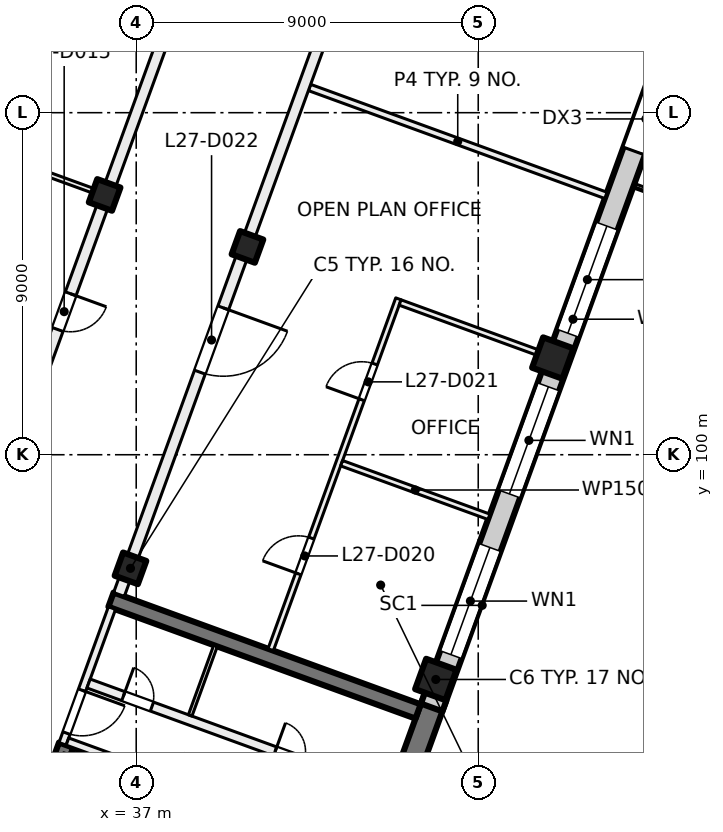
"""IFC4 building model, lengths in metres.
Left out: names, types, materials, properties, quantities, classifications, styles, units other than length and angle.
Written with IfcOpenShell. Run it as: python <this file> out.ifc"""

import sys

from ifc_helpers import new_model, si_unit, direction, frame, frame_2d, origin, origin_2d, place, context, subcontext, project, spatial, rectangle, extrude, element, fill, save


model = new_model("IFC4")
c1 = context("Model", 3, precision=1e-05, world=origin(), true_north=direction((0.0, 1.0)))
c2 = subcontext(c1, "Body", "Model", "MODEL_VIEW")
j1 = project(units=[si_unit("LENGTHUNIT", "METRE"), si_unit("PLANEANGLEUNIT", "RADIAN")], contexts=[c1])
p1 = place(None, origin())
s1 = spatial("IfcSite", under=j1, at=p1, CompositionType="ELEMENT")
p2 = place(p1, origin())
s2 = spatial("IfcBuilding", under=s1, at=p2, CompositionType="ELEMENT")
p3 = place(p2, frame((0.0, 0.0, 117.0)))
s3 = spatial("IfcBuildingStorey", under=s2, at=p3, CompositionType="ELEMENT", Elevation=117.0)
for number, where, z_axis, x_axis in (
    (1, (39.927, 105.468, 0.0), (0.0, 0.0, 1.0), (-0.342, -0.94, 0.0)),
    (2, (36.849, 97.011, 0.0), (0.0, 0.0, 1.0), (-0.342, -0.94, 0.0)),
    (3, (36.169, 106.836, 0.0), (0.0, 0.0, 1.0), (-0.342, -0.94, 0.0)),
):
    element("IfcColumn", number, at=place(p3, frame(where, z_axis=z_axis, x_axis=x_axis)), inside=s3, PredefinedType="COLUMN", context=c2, shape_type="SweptSolid", body=[
        extrude(rectangle(XDim=0.65, YDim=0.65, at=origin_2d()), origin(), (0.0, 0.0, 1.0), 4.0),
    ])
for number, where, z_axis, x_axis in (
    (4, (47.962, 102.544, 0.0), (0.0, 0.0, 1.0), (-0.342, -0.94, 0.0)),
    (5, (44.884, 94.087, 0.0), (0.0, 0.0, 1.0), (-0.342, -0.94, 0.0)),
):
    element("IfcColumn", number, at=place(p3, frame(where, z_axis=z_axis, x_axis=x_axis)), inside=s3, PredefinedType="COLUMN", context=c2, shape_type="SweptSolid", body=[
        extrude(rectangle(XDim=0.85, YDim=0.85, at=origin_2d()), origin(), (0.0, 0.0, 1.0), 4.0),
    ])
p4 = place(p3, frame((41.827, 85.249, 0.0), z_axis=(0.0, 0.0, 1.0), x_axis=(0.342017595281, 0.939693548195, 0.0)))
e6 = element("IfcWall", 6, at=p4, inside=s3, PredefinedType="SHEAR", context=c2, shape_type="SweptSolid", body=[
    extrude(rectangle(XDim=8.925, YDim=0.6, at=frame_2d((4.462, 0.0))), origin(), (0.0, 0.0, 1.0), 4.0),
])
p5 = place(p3, frame((30.984, 80.895, 0.0), z_axis=(0.0, 0.0, 1.0), x_axis=(0.342021021735, 0.939692301071, 0.0)))
e7 = element("IfcWall", 7, at=p5, inside=s3, PredefinedType="SHEAR", context=c2, shape_type="SweptSolid", body=[
    extrude(rectangle(XDim=12.2, YDim=0.4, at=frame_2d((6.1, 0.0))), origin(), (0.0, 0.0, 1.0), 4.0),
])
p6 = place(p5, frame((5.45, 0.0, 0.0)))
e8 = element("IfcOpeningElement", 8, at=p6, cuts=e7, PredefinedType="OPENING", context=c2, shape_type="SweptSolid", body=[
    extrude(rectangle(XDim=1.1, YDim=2.1, at=frame_2d((0.55, 1.05))), frame((0.0, 0.21, 0.0), z_axis=(0.0, -1.0, 0.0), x_axis=(1.0, 0.0, 0.0)), (0.0, 0.0, 1.0), 0.42),
])
p7 = place(p5, frame((7.85, 0.0, 0.0)))
e9 = element("IfcOpeningElement", 9, at=p7, cuts=e7, PredefinedType="OPENING", context=c2, shape_type="SweptSolid", body=[
    extrude(rectangle(XDim=1.1, YDim=2.1, at=frame_2d((0.55, 1.05))), frame((0.0, 0.21, 0.0), z_axis=(0.0, -1.0, 0.0), x_axis=(1.0, 0.0, 0.0)), (0.0, 0.0, 1.0), 0.42),
])
p8 = place(p5, frame((10.25, 0.0, 0.0)))
e10 = element("IfcOpeningElement", 10, at=p8, cuts=e7, PredefinedType="OPENING", context=c2, shape_type="SweptSolid", body=[
    extrude(rectangle(XDim=1.1, YDim=2.1, at=frame_2d((0.55, 1.05))), frame((0.0, 0.21, 0.0), z_axis=(0.0, -1.0, 0.0), x_axis=(1.0, 0.0, 0.0)), (0.0, 0.0, 1.0), 0.42),
])
p9 = place(p3, frame((38.095, 91.077, 0.0), z_axis=(0.0, 0.0, 1.0), x_axis=(-0.939676934218, 0.342063238742, 0.0)))
e11 = element("IfcWall", 11, at=p9, inside=s3, PredefinedType="SHEAR", context=c2, shape_type="SweptSolid", body=[
    extrude(rectangle(XDim=3.0, YDim=0.4, at=frame_2d((1.5, 0.0))), origin(), (0.0, 0.0, 1.0), 4.0),
])
p10 = place(p3, frame((44.418, 93.245, 0.0), z_axis=(0.0, 0.0, 1.0), x_axis=(-0.93969060187, 0.342025690201, 0.0)))
e12 = element("IfcWall", 12, at=p10, inside=s3, PredefinedType="SHEAR", context=c2, shape_type="SweptSolid", body=[
    extrude(rectangle(XDim=8.6, YDim=0.4, at=frame_2d((4.3, 0.0))), origin(), (0.0, 0.0, 1.0), 4.0),
])
p11 = place(p3, frame((52.212, 113.783, 0.0), z_axis=(0.0, 0.0, 1.0), x_axis=(-0.34202521188, -0.939690775968, 0.0)))
e13 = element("IfcWall", 13, at=p11, inside=s3, PredefinedType="SOLIDWALL", context=c2, shape_type="SweptSolid", body=[
    extrude(rectangle(XDim=21.745, YDim=0.6, at=frame_2d((10.873, 0.0))), origin(), (0.0, 0.0, 1.0), 3.625),
])
p12 = place(p11, frame((4.365, 0.0, 0.0)))
e14 = element("IfcOpeningElement", 14, at=p12, cuts=e13, PredefinedType="OPENING", context=c2, shape_type="SweptSolid", body=[
    extrude(rectangle(XDim=1.8, YDim=2.4, at=frame_2d((0.9, 1.2))), frame((0.0, 0.31, 0.0), z_axis=(0.0, -1.0, 0.0), x_axis=(1.0, 0.0, 0.0)), (0.0, 0.0, 1.0), 0.62),
])
p13 = place(p11, frame((8.265, 0.0, 0.9)))
e15 = element("IfcOpeningElement", 15, at=p13, cuts=e13, PredefinedType="OPENING", context=c2, shape_type="SweptSolid", body=[
    extrude(rectangle(XDim=3.0, YDim=2.4, at=frame_2d((1.5, 1.2))), frame((0.0, 0.31, 0.0), z_axis=(0.0, -1.0, 0.0), x_axis=(1.0, 0.0, 0.0)), (0.0, 0.0, 1.0), 0.62),
])
p14 = place(p11, frame((12.765, 0.0, 0.9)))
e16 = element("IfcOpeningElement", 16, at=p14, cuts=e13, PredefinedType="OPENING", context=c2, shape_type="SweptSolid", body=[
    extrude(rectangle(XDim=3.0, YDim=2.4, at=frame_2d((1.5, 1.2))), frame((0.0, 0.31, 0.0), z_axis=(0.0, -1.0, 0.0), x_axis=(1.0, 0.0, 0.0)), (0.0, 0.0, 1.0), 0.62),
])
p15 = place(p11, frame((17.265, 0.0, 0.9)))
e17 = element("IfcOpeningElement", 17, at=p15, cuts=e13, PredefinedType="OPENING", context=c2, shape_type="SweptSolid", body=[
    extrude(rectangle(XDim=3.0, YDim=2.4, at=frame_2d((1.5, 1.2))), frame((0.0, 0.31, 0.0), z_axis=(0.0, -1.0, 0.0), x_axis=(1.0, 0.0, 0.0)), (0.0, 0.0, 1.0), 0.62),
])
p16 = place(p3, frame((24.666, 100.669, 0.0), z_axis=(0.0, 0.0, 1.0), x_axis=(0.34201964167, 0.939692803373, 0.0)))
e18 = element("IfcWall", 18, at=p16, inside=s3, PredefinedType="SOLIDWALL", context=c2, shape_type="SweptSolid", body=[
    extrude(rectangle(XDim=32.884, YDim=0.6, at=frame_2d((16.442, 0.0))), origin(), (0.0, 0.0, 1.0), 3.625),
])
p17 = place(p16, frame((1.48, 0.0, 0.9)))
e19 = element("IfcOpeningElement", 19, at=p17, cuts=e18, PredefinedType="OPENING", context=c2, shape_type="SweptSolid", body=[
    extrude(rectangle(XDim=3.0, YDim=2.4, at=frame_2d((1.5, 1.2))), frame((0.0, 0.31, 0.0), z_axis=(0.0, -1.0, 0.0), x_axis=(1.0, 0.0, 0.0)), (0.0, 0.0, 1.0), 0.62),
])
p18 = place(p16, frame((5.98, 0.0, 0.9)))
e20 = element("IfcOpeningElement", 20, at=p18, cuts=e18, PredefinedType="OPENING", context=c2, shape_type="SweptSolid", body=[
    extrude(rectangle(XDim=3.0, YDim=2.4, at=frame_2d((1.5, 1.2))), frame((0.0, 0.31, 0.0), z_axis=(0.0, -1.0, 0.0), x_axis=(1.0, 0.0, 0.0)), (0.0, 0.0, 1.0), 0.62),
])
p19 = place(p16, frame((10.48, 0.0, 0.9)))
e21 = element("IfcOpeningElement", 21, at=p19, cuts=e18, PredefinedType="OPENING", context=c2, shape_type="SweptSolid", body=[
    extrude(rectangle(XDim=3.0, YDim=2.4, at=frame_2d((1.5, 1.2))), frame((0.0, 0.31, 0.0), z_axis=(0.0, -1.0, 0.0), x_axis=(1.0, 0.0, 0.0)), (0.0, 0.0, 1.0), 0.62),
])
p20 = place(p16, frame((14.98, 0.0, 0.9)))
e22 = element("IfcOpeningElement", 22, at=p20, cuts=e18, PredefinedType="OPENING", context=c2, shape_type="SweptSolid", body=[
    extrude(rectangle(XDim=3.0, YDim=2.4, at=frame_2d((1.5, 1.2))), frame((0.0, 0.31, 0.0), z_axis=(0.0, -1.0, 0.0), x_axis=(1.0, 0.0, 0.0)), (0.0, 0.0, 1.0), 0.62),
])
p21 = place(p16, frame((20.08, 0.0, 0.0)))
e23 = element("IfcOpeningElement", 23, at=p21, cuts=e18, PredefinedType="OPENING", context=c2, shape_type="SweptSolid", body=[
    extrude(rectangle(XDim=1.8, YDim=2.4, at=frame_2d((0.9, 1.2))), frame((0.0, 0.31, 0.0), z_axis=(0.0, -1.0, 0.0), x_axis=(1.0, 0.0, 0.0)), (0.0, 0.0, 1.0), 0.62),
])
p22 = place(p16, frame((23.98, 0.0, 0.9)))
e24 = element("IfcOpeningElement", 24, at=p22, cuts=e18, PredefinedType="OPENING", context=c2, shape_type="SweptSolid", body=[
    extrude(rectangle(XDim=3.0, YDim=2.4, at=frame_2d((1.5, 1.2))), frame((0.0, 0.31, 0.0), z_axis=(0.0, -1.0, 0.0), x_axis=(1.0, 0.0, 0.0)), (0.0, 0.0, 1.0), 0.62),
])
p23 = place(p16, frame((28.48, 0.0, 0.9)))
e25 = element("IfcOpeningElement", 25, at=p23, cuts=e18, PredefinedType="OPENING", context=c2, shape_type="SweptSolid", body=[
    extrude(rectangle(XDim=3.0, YDim=2.4, at=frame_2d((1.5, 1.2))), frame((0.0, 0.31, 0.0), z_axis=(0.0, -1.0, 0.0), x_axis=(1.0, 0.0, 0.0)), (0.0, 0.0, 1.0), 0.62),
])
p24 = place(p3, frame((36.362, 95.964, 0.0), z_axis=(0.0, 0.0, 1.0), x_axis=(-0.341995824804, -0.939701471648, 0.0)))
e26 = element("IfcWall", 26, at=p24, inside=s3, PredefinedType="PARTITIONING", context=c2, shape_type="SweptSolid", body=[
    extrude(rectangle(XDim=3.8, YDim=0.2, at=frame_2d((1.9, 0.0))), origin(), (0.0, 0.0, 1.0), 3.625),
])
p25 = place(p24, frame((2.3, 0.0, 0.0)))
e27 = element("IfcOpeningElement", 27, at=p25, cuts=e26, PredefinedType="OPENING", context=c2, shape_type="SweptSolid", body=[
    extrude(rectangle(XDim=1.2, YDim=2.1, at=frame_2d((0.6, 1.05))), frame((0.0, 0.11, 0.0), z_axis=(0.0, -1.0, 0.0), x_axis=(1.0, 0.0, 0.0)), (0.0, 0.0, 1.0), 0.22),
])
p26 = place(p3, frame((35.19, 92.453, 0.0), z_axis=(0.0, 0.0, 1.0), x_axis=(0.939691552312, -0.342023078919, 0.0)))
e28 = element("IfcWall", 28, at=p26, inside=s3, PredefinedType="PARTITIONING", context=c2, shape_type="SweptSolid", body=[
    extrude(rectangle(XDim=8.4, YDim=0.2, at=frame_2d((4.2, 0.0))), origin(), (0.0, 0.0, 1.0), 3.625),
])
p27 = place(p26, frame((5.25, 0.0, 0.0)))
e29 = element("IfcOpeningElement", 29, at=p27, cuts=e28, PredefinedType="OPENING", context=c2, shape_type="SweptSolid", body=[
    extrude(rectangle(XDim=1.5, YDim=2.1, at=frame_2d((0.75, 1.05))), frame((0.0, 0.11, 0.0), z_axis=(0.0, -1.0, 0.0), x_axis=(1.0, 0.0, 0.0)), (0.0, 0.0, 1.0), 0.22),
])
p28 = place(p3, frame((35.746, 93.98, 0.0), z_axis=(0.0, 0.0, 1.0), x_axis=(0.939691552312, -0.342023078919, 0.0)))
e30 = element("IfcWall", 30, at=p28, inside=s3, PredefinedType="PARTITIONING", context=c2, shape_type="SweptSolid", body=[
    extrude(rectangle(XDim=8.4, YDim=0.25, at=frame_2d((4.2, 0.0))), origin(), (0.0, 0.0, 1.0), 3.625),
])
p29 = place(p28, frame((0.975, 0.0, 0.0)))
e31 = element("IfcOpeningElement", 31, at=p29, cuts=e30, PredefinedType="OPENING", context=c2, shape_type="SweptSolid", body=[
    extrude(rectangle(XDim=0.8, YDim=2.1, at=frame_2d((0.4, 1.05))), frame((0.0, 0.135, 0.0), z_axis=(0.0, -1.0, 0.0), x_axis=(1.0, 0.0, 0.0)), (0.0, 0.0, 1.0), 0.27),
])
p30 = place(p28, frame((5.225, 0.0, 0.0)))
e32 = element("IfcOpeningElement", 32, at=p30, cuts=e30, PredefinedType="OPENING", context=c2, shape_type="SweptSolid", body=[
    extrude(rectangle(XDim=0.8, YDim=2.1, at=frame_2d((0.4, 1.05))), frame((0.0, 0.135, 0.0), z_axis=(0.0, -1.0, 0.0), x_axis=(1.0, 0.0, 0.0)), (0.0, 0.0, 1.0), 0.27),
])
p31 = place(p3, frame((39.087, 94.973, 0.0), z_axis=(0.0, 0.0, 1.0), x_axis=(-0.342024501273, -0.939691034611, 0.0)))
e33 = element("IfcWall", 33, at=p31, inside=s3, PredefinedType="PARTITIONING", context=c2, shape_type="SweptSolid", body=[
    extrude(rectangle(XDim=1.95, YDim=0.1, at=frame_2d((0.975, 0.0))), origin(), (0.0, 0.0, 1.0), 3.625),
])
p32 = place(p3, frame((28.275, 109.709, 0.0), z_axis=(0.0, 0.0, 1.0), x_axis=(0.939697205528, -0.342007546586, 0.0)))
e34 = element("IfcWall", 34, at=p32, inside=s3, PredefinedType="PARTITIONING", context=c2, shape_type="SweptSolid", body=[
    extrude(rectangle(XDim=8.301, YDim=0.125, at=frame_2d((4.15, 0.0))), origin(), (0.0, 0.0, 1.0), 3.625),
])
p33 = place(p3, frame((44.686, 130.091, 0.0), z_axis=(0.0, 0.0, 1.0), x_axis=(-0.342017360004, -0.939693633828, 0.0)))
e35 = element("IfcWall", 35, at=p33, inside=s3, PredefinedType="PARTITIONING", context=c2, shape_type="SweptSolid", body=[
    extrude(rectangle(XDim=34.516, YDim=0.3, at=frame_2d((17.258, 0.0))), origin(), (0.0, 0.0, 1.0), 3.625),
])
p34 = place(p33, frame((27.515, 0.0, 0.0)))
e36 = element("IfcOpeningElement", 36, at=p34, cuts=e35, PredefinedType="OPENING", context=c2, shape_type="SweptSolid", body=[
    extrude(rectangle(XDim=1.0, YDim=2.1, at=frame_2d((0.5, 1.05))), frame((0.0, 0.16, 0.0), z_axis=(0.0, -1.0, 0.0), x_axis=(1.0, 0.0, 0.0)), (0.0, 0.0, 1.0), 0.32),
])
p35 = place(p33, frame((16.865, 0.0, 0.0)))
e37 = element("IfcOpeningElement", 37, at=p35, cuts=e35, PredefinedType="OPENING", context=c2, shape_type="SweptSolid", body=[
    extrude(rectangle(XDim=1.8, YDim=2.1, at=frame_2d((0.9, 1.05))), frame((0.0, 0.16, 0.0), z_axis=(0.0, -1.0, 0.0), x_axis=(1.0, 0.0, 0.0)), (0.0, 0.0, 1.0), 0.32),
])
p36 = place(p33, frame((2.554, 0.0, 0.0)))
e38 = element("IfcOpeningElement", 38, at=p36, cuts=e35, PredefinedType="OPENING", context=c2, shape_type="SweptSolid", body=[
    extrude(rectangle(XDim=1.8, YDim=2.1, at=frame_2d((0.9, 1.05))), frame((0.0, 0.16, 0.0), z_axis=(0.0, -1.0, 0.0), x_axis=(1.0, 0.0, 0.0)), (0.0, 0.0, 1.0), 0.32),
])
p37 = place(p3, frame((40.539, 94.87, 0.0), z_axis=(0.0, 0.0, 1.0), x_axis=(0.342082231415, 0.939670020247, 0.0)))
e39 = element("IfcWall", 39, at=p37, inside=s3, PredefinedType="PARTITIONING", context=c2, shape_type="SweptSolid", body=[
    extrude(rectangle(XDim=9.825, YDim=0.15, at=frame_2d((4.912, 0.0))), origin(), (0.0, 0.0, 1.0), 3.625),
])
p38 = place(p37, frame((2.125, 0.0, 0.0)))
e40 = element("IfcOpeningElement", 40, at=p38, cuts=e39, PredefinedType="OPENING", context=c2, shape_type="SweptSolid", body=[
    extrude(rectangle(XDim=1.0, YDim=2.1, at=frame_2d((0.5, 1.05))), frame((0.0, 0.085, 0.0), z_axis=(0.0, -1.0, 0.0), x_axis=(1.0, 0.0, 0.0)), (0.0, 0.0, 1.0), 0.17),
])
p39 = place(p37, frame((7.0, 0.0, 0.0)))
e41 = element("IfcOpeningElement", 41, at=p39, cuts=e39, PredefinedType="OPENING", context=c2, shape_type="SweptSolid", body=[
    extrude(rectangle(XDim=1.0, YDim=2.1, at=frame_2d((0.5, 1.05))), frame((0.0, 0.085, 0.0), z_axis=(0.0, -1.0, 0.0), x_axis=(1.0, 0.0, 0.0)), (0.0, 0.0, 1.0), 0.17),
])
p40 = place(p3, frame((41.561, 109.663, 0.0), z_axis=(0.0, 0.0, 1.0), x_axis=(0.939673986983, -0.342071334939, 0.0)))
e42 = element("IfcWall", 42, at=p40, inside=s3, PredefinedType="PARTITIONING", context=c2, shape_type="SweptSolid", body=[
    extrude(rectangle(XDim=8.3, YDim=0.175, at=frame_2d((4.15, 0.0))), origin(), (0.0, 0.0, 1.0), 3.625),
])
p41 = place(p3, frame((42.405, 99.777, 0.0), z_axis=(0.0, 0.0, 1.0), x_axis=(0.939765774653, -0.341819087808, 0.0)))
e43 = element("IfcWall", 43, at=p41, inside=s3, PredefinedType="PARTITIONING", context=c2, shape_type="SweptSolid", body=[
    extrude(rectangle(XDim=4.125, YDim=0.15, at=frame_2d((2.063, 0.0))), origin(), (0.0, 0.0, 1.0), 3.625),
])
p42 = place(p3, frame((47.314, 125.909, 0.0), z_axis=(0.0, 0.0, 1.0), x_axis=(-0.342010770371, -0.939696032209, 0.0)))
e44 = element("IfcWall", 44, at=p42, inside=s3, PredefinedType="PARTITIONING", context=c2, shape_type="SweptSolid", body=[
    extrude(rectangle(XDim=31.485, YDim=0.3, at=frame_2d((15.742, 0.0))), origin(), (0.0, 0.0, 1.0), 3.625),
])
p43 = place(p42, frame((23.459, 0.0, 0.0)))
e45 = element("IfcOpeningElement", 45, at=p43, cuts=e44, PredefinedType="OPENING", context=c2, shape_type="SweptSolid", body=[
    extrude(rectangle(XDim=1.8, YDim=2.1, at=frame_2d((0.9, 1.05))), frame((0.0, 0.16, 0.0), z_axis=(0.0, -1.0, 0.0), x_axis=(1.0, 0.0, 0.0)), (0.0, 0.0, 1.0), 0.32),
])
p44 = place(p42, frame((14.385, 0.0, 0.0)))
e46 = element("IfcOpeningElement", 46, at=p44, cuts=e44, PredefinedType="OPENING", context=c2, shape_type="SweptSolid", body=[
    extrude(rectangle(XDim=1.2, YDim=2.1, at=frame_2d((0.6, 1.05))), frame((0.0, 0.16, 0.0), z_axis=(0.0, -1.0, 0.0), x_axis=(1.0, 0.0, 0.0)), (0.0, 0.0, 1.0), 0.32),
])
p45 = place(p42, frame((9.885, 0.0, 0.0)))
e47 = element("IfcOpeningElement", 47, at=p45, cuts=e44, PredefinedType="OPENING", context=c2, shape_type="SweptSolid", body=[
    extrude(rectangle(XDim=1.2, YDim=2.1, at=frame_2d((0.6, 1.05))), frame((0.0, 0.16, 0.0), z_axis=(0.0, -1.0, 0.0), x_axis=(1.0, 0.0, 0.0)), (0.0, 0.0, 1.0), 0.32),
])
p46 = place(p42, frame((5.384, 0.0, 0.0)))
e48 = element("IfcOpeningElement", 48, at=p46, cuts=e44, PredefinedType="OPENING", context=c2, shape_type="SweptSolid", body=[
    extrude(rectangle(XDim=1.2, YDim=2.1, at=frame_2d((0.6, 1.05))), frame((0.0, 0.16, 0.0), z_axis=(0.0, -1.0, 0.0), x_axis=(1.0, 0.0, 0.0)), (0.0, 0.0, 1.0), 0.32),
])
p47 = place(p3, frame((43.944, 104.006, 0.0), z_axis=(0.0, 0.0, 1.0), x_axis=(0.939689717042, -0.34202812119, 0.0)))
e49 = element("IfcWall", 49, at=p47, inside=s3, PredefinedType="PARTITIONING", context=c2, shape_type="SweptSolid", body=[
    extrude(rectangle(XDim=4.126, YDim=0.15, at=frame_2d((2.063, 0.0))), origin(), (0.0, 0.0, 1.0), 3.625),
])
p48 = place(p12, origin())
e50 = element("IfcDoor", 50, at=p48, inside=s3, OperationType="DOUBLE_DOOR_SINGLE_SWING", PredefinedType="DOOR", context=c2, shape_type="SweptSolid", body=[
    extrude(rectangle(XDim=1.8, YDim=2.4, at=frame_2d((0.9, 1.2))), frame((0.0, 0.025, 0.0), z_axis=(0.0, -1.0, 0.0), x_axis=(1.0, 0.0, 0.0)), (0.0, 0.0, 1.0), 0.05),
])
fill(e14, e50)
p49 = place(p13, origin())
e51 = element("IfcWindow", 51, at=p49, inside=s3, PartitioningType="SINGLE_PANEL", PredefinedType="WINDOW", context=c2, shape_type="SweptSolid", body=[
    extrude(rectangle(XDim=3.0, YDim=2.4, at=frame_2d((1.5, 1.2))), frame((0.0, 0.03, 0.0), z_axis=(0.0, -1.0, 0.0), x_axis=(1.0, 0.0, 0.0)), (0.0, 0.0, 1.0), 0.06),
])
fill(e15, e51)
p50 = place(p14, origin())
e52 = element("IfcWindow", 52, at=p50, inside=s3, PartitioningType="SINGLE_PANEL", PredefinedType="WINDOW", context=c2, shape_type="SweptSolid", body=[
    extrude(rectangle(XDim=3.0, YDim=2.4, at=frame_2d((1.5, 1.2))), frame((0.0, 0.03, 0.0), z_axis=(0.0, -1.0, 0.0), x_axis=(1.0, 0.0, 0.0)), (0.0, 0.0, 1.0), 0.06),
])
fill(e16, e52)
p51 = place(p15, origin())
e53 = element("IfcWindow", 53, at=p51, inside=s3, PartitioningType="SINGLE_PANEL", PredefinedType="WINDOW", context=c2, shape_type="SweptSolid", body=[
    extrude(rectangle(XDim=3.0, YDim=2.4, at=frame_2d((1.5, 1.2))), frame((0.0, 0.03, 0.0), z_axis=(0.0, -1.0, 0.0), x_axis=(1.0, 0.0, 0.0)), (0.0, 0.0, 1.0), 0.06),
])
fill(e17, e53)
p52 = place(p25, origin())
e54 = element("IfcDoor", 54, at=p52, inside=s3, OperationType="DOUBLE_DOOR_SINGLE_SWING", PredefinedType="DOOR", context=c2, shape_type="SweptSolid", body=[
    extrude(rectangle(XDim=1.2, YDim=2.1, at=frame_2d((0.6, 1.05))), frame((0.0, 0.025, 0.0), z_axis=(0.0, -1.0, 0.0), x_axis=(1.0, 0.0, 0.0)), (0.0, 0.0, 1.0), 0.05),
])
fill(e27, e54)
p53 = place(p29, origin())
e55 = element("IfcDoor", 55, at=p53, inside=s3, OperationType="SINGLE_SWING_RIGHT", PredefinedType="DOOR", context=c2, shape_type="SweptSolid", body=[
    extrude(rectangle(XDim=0.8, YDim=2.1, at=frame_2d((0.4, 1.05))), frame((0.0, 0.025, 0.0), z_axis=(0.0, -1.0, 0.0), x_axis=(1.0, 0.0, 0.0)), (0.0, 0.0, 1.0), 0.05),
])
fill(e31, e55)
p54 = place(p30, origin())
e56 = element("IfcDoor", 56, at=p54, inside=s3, OperationType="SINGLE_SWING_LEFT", PredefinedType="DOOR", context=c2, shape_type="SweptSolid", body=[
    extrude(rectangle(XDim=0.8, YDim=2.1, at=frame_2d((0.4, 1.05))), frame((0.0, 0.025, 0.0), z_axis=(0.0, -1.0, 0.0), x_axis=(1.0, 0.0, 0.0)), (0.0, 0.0, 1.0), 0.05),
])
fill(e32, e56)
p55 = place(p34, origin())
e57 = element("IfcDoor", 57, at=p55, inside=s3, OperationType="SINGLE_SWING_RIGHT", PredefinedType="DOOR", context=c2, shape_type="SweptSolid", body=[
    extrude(rectangle(XDim=1.0, YDim=2.1, at=frame_2d((0.5, 1.05))), frame((0.0, 0.025, 0.0), z_axis=(0.0, -1.0, 0.0), x_axis=(1.0, 0.0, 0.0)), (0.0, 0.0, 1.0), 0.05),
])
fill(e36, e57)
p56 = place(p38, origin())
e58 = element("IfcDoor", 58, at=p56, inside=s3, OperationType="SINGLE_SWING_LEFT", PredefinedType="DOOR", context=c2, shape_type="SweptSolid", body=[
    extrude(rectangle(XDim=1.0, YDim=2.1, at=frame_2d((0.5, 1.05))), frame((0.0, 0.025, 0.0), z_axis=(0.0, -1.0, 0.0), x_axis=(1.0, 0.0, 0.0)), (0.0, 0.0, 1.0), 0.05),
])
fill(e40, e58)
p57 = place(p39, origin())
e59 = element("IfcDoor", 59, at=p57, inside=s3, OperationType="SINGLE_SWING_LEFT", PredefinedType="DOOR", context=c2, shape_type="SweptSolid", body=[
    extrude(rectangle(XDim=1.0, YDim=2.1, at=frame_2d((0.5, 1.05))), frame((0.0, 0.025, 0.0), z_axis=(0.0, -1.0, 0.0), x_axis=(1.0, 0.0, 0.0)), (0.0, 0.0, 1.0), 0.05),
])
fill(e41, e59)
p58 = place(p43, origin())
e60 = element("IfcDoor", 60, at=p58, inside=s3, OperationType="DOUBLE_DOOR_SINGLE_SWING", PredefinedType="DOOR", context=c2, shape_type="SweptSolid", body=[
    extrude(rectangle(XDim=1.8, YDim=2.1, at=frame_2d((0.9, 1.05))), frame((0.0, 0.025, 0.0), z_axis=(0.0, -1.0, 0.0), x_axis=(1.0, 0.0, 0.0)), (0.0, 0.0, 1.0), 0.05),
])
fill(e45, e60)
save(model, sys.argv[1])
